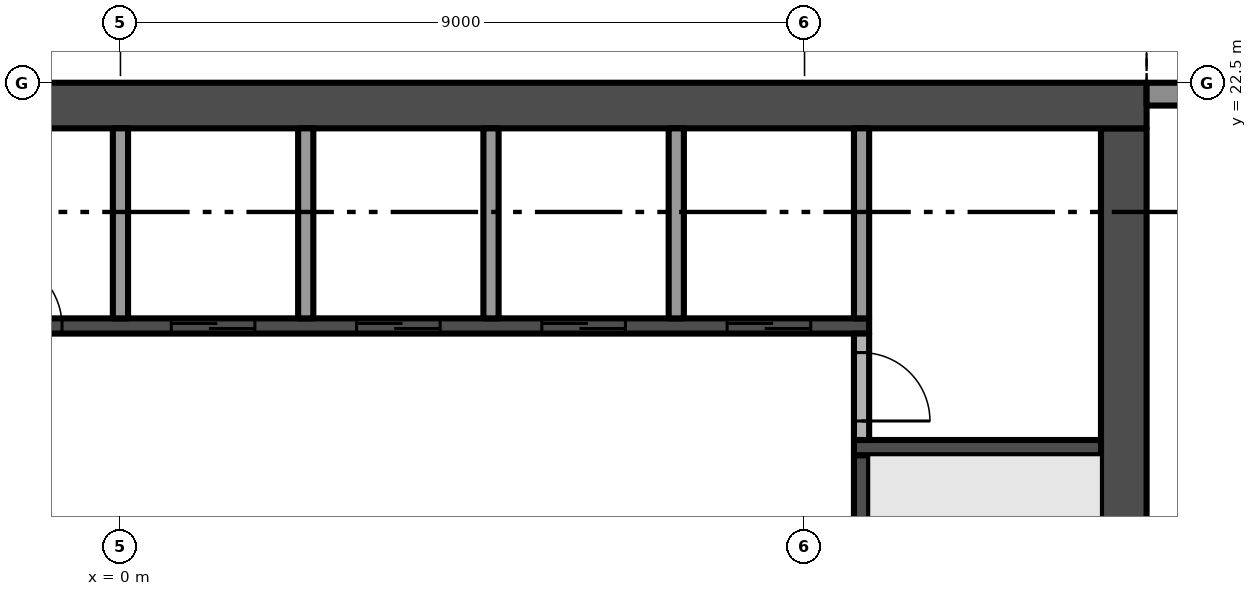
"""IFC4 building model, lengths in metres.
Left out: names, types, materials, properties, quantities, classifications, styles, units other than length and angle.
Written with IfcOpenShell. Run it as: python <this file> out.ifc"""

import sys

from ifc_helpers import new_model, si_unit, direction, frame, frame_2d, origin, place, context, subcontext, project, spatial, polyline, rectangle, outline, extrude, element, fill, save


model = new_model("IFC4")
c1 = context("Model", 3, precision=1e-05, world=origin(), true_north=direction((0.0, 1.0)))
c2 = subcontext(c1, "Body", "Model", "MODEL_VIEW")
j1 = project(units=[si_unit("LENGTHUNIT", "METRE"), si_unit("PLANEANGLEUNIT", "RADIAN")], contexts=[c1])
p1 = place(None, origin())
s1 = spatial("IfcSite", under=j1, at=p1, CompositionType="ELEMENT")
p2 = place(p1, origin())
s2 = spatial("IfcBuilding", under=s1, at=p2, CompositionType="ELEMENT")
p3 = place(p2, frame((0.0, 0.0, 265.4)))
s3 = spatial("IfcBuildingStorey", under=s2, at=p3, CompositionType="ELEMENT", Elevation=265.4)
p4 = place(p3, frame((13.2, 5.1, -0.3), z_axis=(0.0, 0.0, 1.0), x_axis=(0.0, 1.0, 0.0)))
e1 = element("IfcWall", 1, at=p4, inside=s3, PredefinedType="SHEAR", context=c2, shape_type="SweptSolid", body=[
    extrude(rectangle(XDim=16.8, YDim=0.6, at=frame_2d((8.4, 0.0))), origin(), (0.0, 0.0, 1.0), 3.8),
])
p5 = place(p4, frame((6.3, 0.0, 0.3)))
e2 = element("IfcOpeningElement", 2, at=p5, cuts=e1, PredefinedType="OPENING", context=c2, shape_type="SweptSolid", body=[
    extrude(rectangle(XDim=1.2, YDim=2.2, at=frame_2d((0.6, 1.1))), frame((0.0, 0.31, 0.0), z_axis=(0.0, -1.0, 0.0), x_axis=(1.0, 0.0, 0.0)), (0.0, 0.0, 1.0), 0.62),
])
p6 = place(p3, frame((13.5, 22.2, -0.3), z_axis=(0.0, 0.0, 1.0), x_axis=(-1.0, 0.0, 0.0)))
e3 = element("IfcWall", 3, at=p6, inside=s3, PredefinedType="SHEAR", context=c2, shape_type="SweptSolid", body=[
    extrude(rectangle(XDim=27.0, YDim=0.6, at=frame_2d((13.5, 0.0))), origin(), (0.0, 0.0, 1.0), 3.8),
])
p7 = place(p3, frame((13.5, 22.35, 0.0), z_axis=(0.0, 0.0, 1.0), x_axis=(1.0, 0.0, 0.0)))
e4 = element("IfcWall", 4, at=p7, inside=s3, PredefinedType="SOLIDWALL", context=c2, shape_type="SweptSolid", body=[
    extrude(rectangle(XDim=4.05, YDim=0.3, at=frame_2d((2.025, 0.0))), origin(), (0.0, 0.0, 1.0), 3.5),
])
p8 = place(p7, frame((0.55, 0.0, 0.0)))
e5 = element("IfcOpeningElement", 5, at=p8, cuts=e4, PredefinedType="OPENING", context=c2, shape_type="SweptSolid", body=[
    extrude(rectangle(XDim=3.2, YDim=2.4, at=frame_2d((1.6, 1.2))), frame((0.0, 0.16, 0.0), z_axis=(0.0, -1.0, 0.0), x_axis=(1.0, 0.0, 0.0)), (0.0, 0.0, 1.0), 0.32),
])
p9 = place(p3, origin())
e6 = element("IfcWall", 6, at=p9, inside=s3, PredefinedType="USERDEFINED", context=c2, shape_type="SweptSolid", body=[
    extrude(outline(polyline([(22.5, 23.1), (21.0, 23.329), (19.5, 23.929), (18.0, 24.671), (16.5, 25.271), (15.0, 25.5), (13.5, 25.271), (13.538, 25.024), (15.0, 25.247), (16.434, 25.028), (17.898, 24.442), (19.398, 23.701), (20.934, 23.086), (22.462, 22.853), (22.5, 23.1)])), origin(), (0.0, 0.0, 1.0), 0.9),
])
p10 = place(p3, frame((-9.85, 19.3, 0.0), z_axis=(0.0, 0.0, 1.0), x_axis=(1.0, 0.0, 0.0)))
e7 = element("IfcWall", 7, at=p10, inside=s3, PredefinedType="SHEAR", context=c2, shape_type="SweptSolid", body=[
    extrude(rectangle(XDim=19.7, YDim=0.2, at=frame_2d((9.85, 0.0))), origin(), (0.0, 0.0, 1.0), 3.5),
])
p11 = place(p10, frame((10.519, 0.0, 0.0)))
e8 = element("IfcOpeningElement", 8, at=p11, cuts=e7, PredefinedType="OPENING", context=c2, shape_type="SweptSolid", body=[
    extrude(rectangle(XDim=1.1, YDim=2.1, at=frame_2d((0.55, 1.05))), frame((0.0, 0.11, 0.0), z_axis=(0.0, -1.0, 0.0), x_axis=(1.0, 0.0, 0.0)), (0.0, 0.0, 1.0), 0.22),
])
p12 = place(p10, frame((12.956, 0.0, 0.0)))
e9 = element("IfcOpeningElement", 9, at=p12, cuts=e7, PredefinedType="OPENING", context=c2, shape_type="SweptSolid", body=[
    extrude(rectangle(XDim=1.1, YDim=2.1, at=frame_2d((0.55, 1.05))), frame((0.0, 0.11, 0.0), z_axis=(0.0, -1.0, 0.0), x_axis=(1.0, 0.0, 0.0)), (0.0, 0.0, 1.0), 0.22),
])
p13 = place(p10, frame((15.394, 0.0, 0.0)))
e10 = element("IfcOpeningElement", 10, at=p13, cuts=e7, PredefinedType="OPENING", context=c2, shape_type="SweptSolid", body=[
    extrude(rectangle(XDim=1.1, YDim=2.1, at=frame_2d((0.55, 1.05))), frame((0.0, 0.11, 0.0), z_axis=(0.0, -1.0, 0.0), x_axis=(1.0, 0.0, 0.0)), (0.0, 0.0, 1.0), 0.22),
])
p14 = place(p10, frame((17.831, 0.0, 0.0)))
e11 = element("IfcOpeningElement", 11, at=p14, cuts=e7, PredefinedType="OPENING", context=c2, shape_type="SweptSolid", body=[
    extrude(rectangle(XDim=1.1, YDim=2.1, at=frame_2d((0.55, 1.05))), frame((0.0, 0.11, 0.0), z_axis=(0.0, -1.0, 0.0), x_axis=(1.0, 0.0, 0.0)), (0.0, 0.0, 1.0), 0.22),
])
p15 = place(p10, frame((0.869, 0.0, 0.0)))
e12 = element("IfcOpeningElement", 12, at=p15, cuts=e7, PredefinedType="OPENING", context=c2, shape_type="SweptSolid", body=[
    extrude(rectangle(XDim=0.9, YDim=2.1, at=frame_2d((0.45, 1.05))), frame((0.0, 0.11, 0.0), z_axis=(0.0, -1.0, 0.0), x_axis=(1.0, 0.0, 0.0)), (0.0, 0.0, 1.0), 0.22),
])
p16 = place(p10, frame((4.525, 0.0, 0.0)))
e13 = element("IfcOpeningElement", 13, at=p16, cuts=e7, PredefinedType="OPENING", context=c2, shape_type="SweptSolid", body=[
    extrude(rectangle(XDim=0.9, YDim=2.1, at=frame_2d((0.45, 1.05))), frame((0.0, 0.11, 0.0), z_axis=(0.0, -1.0, 0.0), x_axis=(1.0, 0.0, 0.0)), (0.0, 0.0, 1.0), 0.22),
])
p17 = place(p10, frame((8.181, 0.0, 0.0)))
e14 = element("IfcOpeningElement", 14, at=p17, cuts=e7, PredefinedType="OPENING", context=c2, shape_type="SweptSolid", body=[
    extrude(rectangle(XDim=0.9, YDim=2.1, at=frame_2d((0.45, 1.05))), frame((0.0, 0.11, 0.0), z_axis=(0.0, -1.0, 0.0), x_axis=(1.0, 0.0, 0.0)), (0.0, 0.0, 1.0), 0.22),
])
for number, where, z_axis, x_axis in (
    (15, (0.0, 19.4, 0.0), (0.0, 0.0, 1.0), (0.0, 1.0, 0.0)),
    (16, (2.438, 19.4, 0.0), (0.0, 0.0, 1.0), (0.0, 1.0, 0.0)),
    (17, (4.875, 19.4, 0.0), (0.0, 0.0, 1.0), (0.0, 1.0, 0.0)),
    (18, (7.312, 19.4, 0.0), (0.0, 0.0, 1.0), (0.0, 1.0, 0.0)),
):
    element("IfcWall", number, at=place(p3, frame(where, z_axis=z_axis, x_axis=x_axis)), inside=s3, PredefinedType="PARTITIONING", context=c2, shape_type="SweptSolid", body=[
        extrude(rectangle(XDim=2.5, YDim=0.2, at=frame_2d((1.25, 0.0))), origin(), (0.0, 0.0, 1.0), 3.5),
    ])
p18 = place(p3, frame((9.75, 16.1, 0.0), z_axis=(0.0, 0.0, 1.0), x_axis=(0.0, 1.0, 0.0)))
e19 = element("IfcWall", 19, at=p18, inside=s3, PredefinedType="SHEAR", context=c2, shape_type="SweptSolid", body=[
    extrude(rectangle(XDim=1.5, YDim=0.2, at=frame_2d((0.75, 0.0))), origin(), (0.0, 0.0, 1.0), 3.5),
])
p19 = place(p3, frame((9.65, 17.7, 0.0), z_axis=(0.0, 0.0, 1.0), x_axis=(1.0, 0.0, 0.0)))
e20 = element("IfcWall", 20, at=p19, inside=s3, PredefinedType="SHEAR", context=c2, shape_type="SweptSolid", body=[
    extrude(rectangle(XDim=3.25, YDim=0.2, at=frame_2d((1.625, 0.0))), origin(), (0.0, 0.0, 1.0), 3.5),
])
p20 = place(p3, frame((9.75, 19.2, 0.0), z_axis=(0.0, 0.0, 1.0), x_axis=(0.0, -1.0, 0.0)))
e21 = element("IfcWall", 21, at=p20, inside=s3, PredefinedType="PARTITIONING", context=c2, shape_type="SweptSolid", body=[
    extrude(rectangle(XDim=1.4, YDim=0.2, at=frame_2d((0.7, 0.0))), origin(), (0.0, 0.0, 1.0), 3.5),
])
p21 = place(p20, frame((0.25, 0.0, 0.0)))
e22 = element("IfcOpeningElement", 22, at=p21, cuts=e21, PredefinedType="OPENING", context=c2, shape_type="SweptSolid", body=[
    extrude(rectangle(XDim=0.9, YDim=2.1, at=frame_2d((0.45, 1.05))), frame((0.0, 0.11, 0.0), z_axis=(0.0, -1.0, 0.0), x_axis=(1.0, 0.0, 0.0)), (0.0, 0.0, 1.0), 0.22),
])
p22 = place(p3, frame((9.75, 19.4, 0.0), z_axis=(0.0, 0.0, 1.0), x_axis=(0.0, 1.0, 0.0)))
e23 = element("IfcWall", 23, at=p22, inside=s3, PredefinedType="PARTITIONING", context=c2, shape_type="SweptSolid", body=[
    extrude(rectangle(XDim=2.5, YDim=0.2, at=frame_2d((1.25, 0.0))), origin(), (0.0, 0.0, 1.0), 3.5),
])
p23 = place(p11, origin())
e24 = element("IfcDoor", 24, at=p23, inside=s3, OperationType="SLIDING_TO_RIGHT", PredefinedType="DOOR", context=c2, shape_type="SweptSolid", body=[
    extrude(rectangle(XDim=1.1, YDim=2.1, at=frame_2d((0.55, 1.05))), frame((0.0, 0.025, 0.0), z_axis=(0.0, -1.0, 0.0), x_axis=(1.0, 0.0, 0.0)), (0.0, 0.0, 1.0), 0.05),
])
fill(e8, e24)
p24 = place(p12, origin())
e25 = element("IfcDoor", 25, at=p24, inside=s3, OperationType="SLIDING_TO_RIGHT", PredefinedType="DOOR", context=c2, shape_type="SweptSolid", body=[
    extrude(rectangle(XDim=1.1, YDim=2.1, at=frame_2d((0.55, 1.05))), frame((0.0, 0.025, 0.0), z_axis=(0.0, -1.0, 0.0), x_axis=(1.0, 0.0, 0.0)), (0.0, 0.0, 1.0), 0.05),
])
fill(e9, e25)
p25 = place(p13, origin())
e26 = element("IfcDoor", 26, at=p25, inside=s3, OperationType="SLIDING_TO_RIGHT", PredefinedType="DOOR", context=c2, shape_type="SweptSolid", body=[
    extrude(rectangle(XDim=1.1, YDim=2.1, at=frame_2d((0.55, 1.05))), frame((0.0, 0.025, 0.0), z_axis=(0.0, -1.0, 0.0), x_axis=(1.0, 0.0, 0.0)), (0.0, 0.0, 1.0), 0.05),
])
fill(e10, e26)
p26 = place(p14, origin())
e27 = element("IfcDoor", 27, at=p26, inside=s3, OperationType="SLIDING_TO_RIGHT", PredefinedType="DOOR", context=c2, shape_type="SweptSolid", body=[
    extrude(rectangle(XDim=1.1, YDim=2.1, at=frame_2d((0.55, 1.05))), frame((0.0, 0.025, 0.0), z_axis=(0.0, -1.0, 0.0), x_axis=(1.0, 0.0, 0.0)), (0.0, 0.0, 1.0), 0.05),
])
fill(e11, e27)
p27 = place(p21, origin())
e28 = element("IfcDoor", 28, at=p27, inside=s3, OperationType="SINGLE_SWING_RIGHT", PredefinedType="DOOR", context=c2, shape_type="SweptSolid", body=[
    extrude(rectangle(XDim=0.9, YDim=2.1, at=frame_2d((0.45, 1.05))), frame((0.0, 0.025, 0.0), z_axis=(0.0, -1.0, 0.0), x_axis=(1.0, 0.0, 0.0)), (0.0, 0.0, 1.0), 0.05),
])
fill(e22, e28)
p28 = place(p17, origin())
e29 = element("IfcDoor", 29, at=p28, inside=s3, OperationType="SINGLE_SWING_LEFT", PredefinedType="DOOR", context=c2, shape_type="SweptSolid", body=[
    extrude(rectangle(XDim=0.9, YDim=2.1, at=frame_2d((0.45, 1.05))), frame((0.0, 0.025, 0.0), z_axis=(0.0, -1.0, 0.0), x_axis=(1.0, 0.0, 0.0)), (0.0, 0.0, 1.0), 0.05),
])
fill(e14, e29)
save(model, sys.argv[1])
